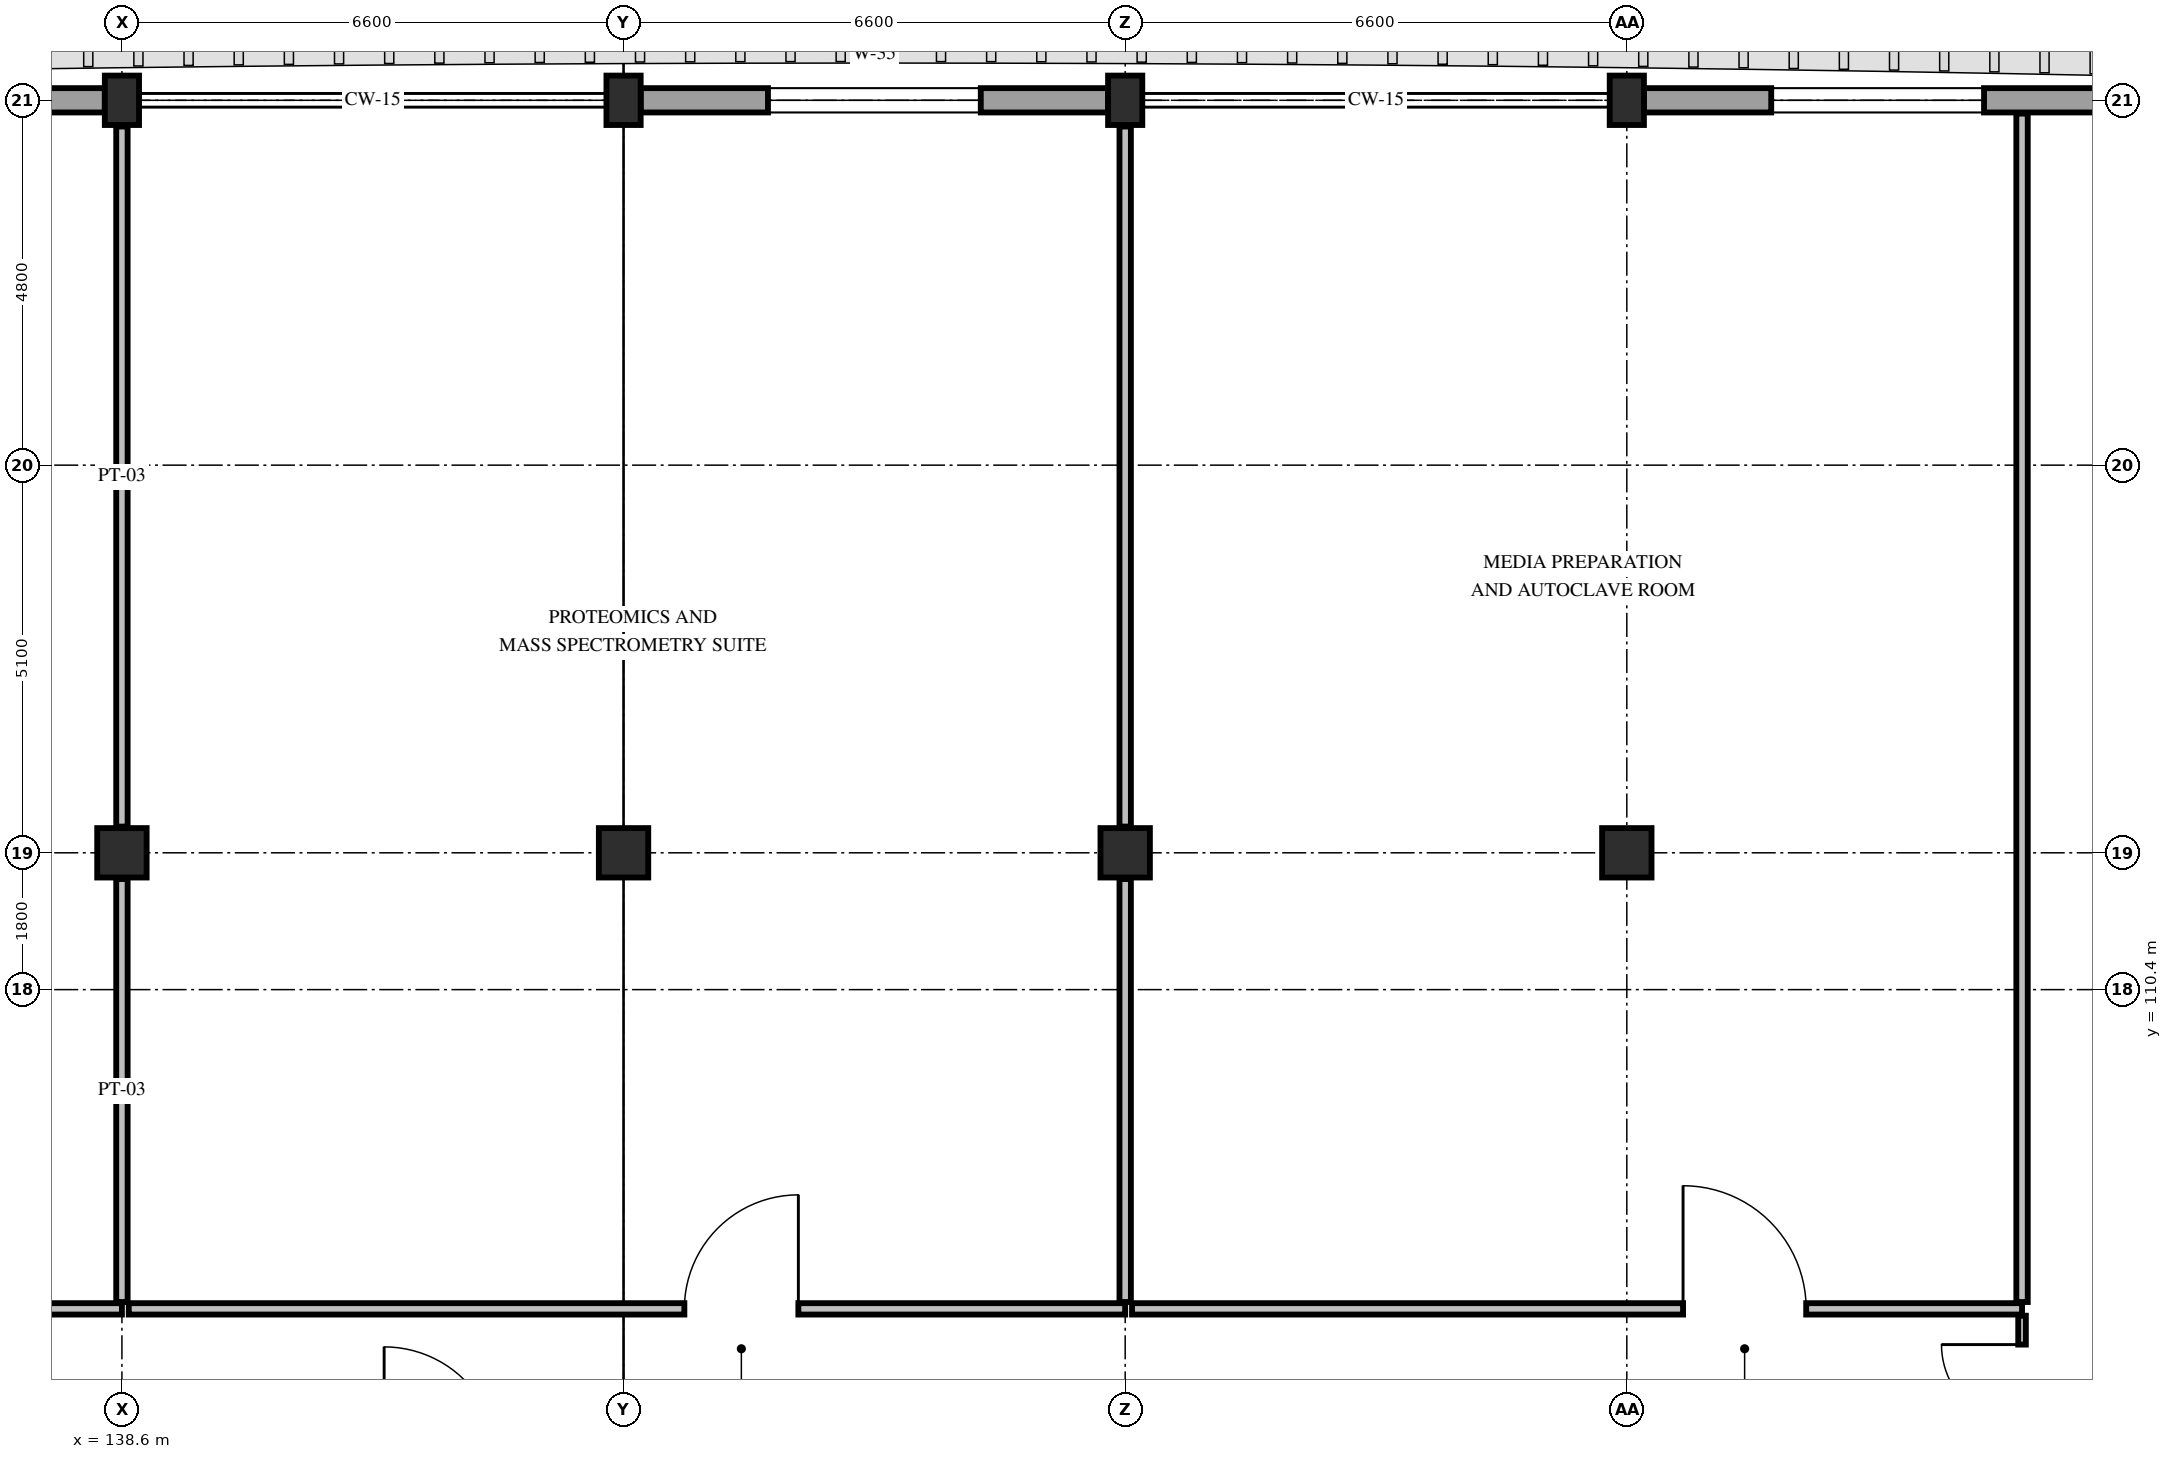
"""IFC4 building model, lengths in metres.
Left out: names, types, materials, properties, quantities, classifications, styles, units other than length and angle.
Written with IfcOpenShell. Run it as: python <this file> out.ifc"""

import sys

from ifc_helpers import new_model, si_unit, direction, frame, frame_2d, origin, origin_2d, place, context, subcontext, project, spatial, rectangle, extrude, element, fill, save


model = new_model("IFC4")
c1 = context("Model", 3, precision=1e-05, world=origin(), true_north=direction((0.0, 1.0)))
c2 = subcontext(c1, "Body", "Model", "MODEL_VIEW")
j1 = project(units=[si_unit("LENGTHUNIT", "METRE"), si_unit("PLANEANGLEUNIT", "RADIAN")], contexts=[c1])
p1 = place(None, origin())
s1 = spatial("IfcSite", under=j1, at=p1, CompositionType="ELEMENT")
p2 = place(p1, origin())
s2 = spatial("IfcBuilding", under=s1, at=p2, CompositionType="ELEMENT")
p3 = place(p2, frame((0.0, 0.0, 15.0)))
s3 = spatial("IfcBuildingStorey", under=s2, at=p3, CompositionType="ELEMENT", Elevation=15.0)
p4 = place(p3, frame((138.6, 112.2, 0.0), z_axis=(0.0, 0.0, 1.0), x_axis=(1.0, 0.0, 0.0)))
e1 = element("IfcColumn", 1, at=p4, inside=s3, PredefinedType="COLUMN", context=c2, shape_type="SweptSolid", body=[
    extrude(rectangle(XDim=0.65, YDim=0.65, at=origin_2d()), origin(), (0.0, 0.0, 1.0), 4.8),
])
p5 = place(p3, frame((138.6, 122.1, 0.0), z_axis=(0.0, 0.0, 1.0), x_axis=(1.0, 0.0, 0.0)))
e2 = element("IfcColumn", 2, at=p5, inside=s3, PredefinedType="PILASTER", context=c2, shape_type="SweptSolid", body=[
    extrude(rectangle(XDim=0.45, YDim=0.65, at=origin_2d()), origin(), (0.0, 0.0, 1.0), 4.8),
])
p6 = place(p3, frame((145.2, 112.2, 0.0), z_axis=(0.0, 0.0, 1.0), x_axis=(1.0, 0.0, 0.0)))
e3 = element("IfcColumn", 3, at=p6, inside=s3, PredefinedType="COLUMN", context=c2, shape_type="SweptSolid", body=[
    extrude(rectangle(XDim=0.65, YDim=0.65, at=origin_2d()), origin(), (0.0, 0.0, 1.0), 4.8),
])
p7 = place(p3, frame((145.2, 122.1, 0.0), z_axis=(0.0, 0.0, 1.0), x_axis=(1.0, 0.0, 0.0)))
e4 = element("IfcColumn", 4, at=p7, inside=s3, PredefinedType="PILASTER", context=c2, shape_type="SweptSolid", body=[
    extrude(rectangle(XDim=0.45, YDim=0.65, at=origin_2d()), origin(), (0.0, 0.0, 1.0), 4.8),
])
p8 = place(p3, frame((151.8, 112.2, 0.0), z_axis=(0.0, 0.0, 1.0), x_axis=(1.0, 0.0, 0.0)))
e5 = element("IfcColumn", 5, at=p8, inside=s3, PredefinedType="COLUMN", context=c2, shape_type="SweptSolid", body=[
    extrude(rectangle(XDim=0.65, YDim=0.65, at=origin_2d()), origin(), (0.0, 0.0, 1.0), 4.8),
])
p9 = place(p3, frame((151.8, 122.1, 0.0), z_axis=(0.0, 0.0, 1.0), x_axis=(1.0, 0.0, 0.0)))
e6 = element("IfcColumn", 6, at=p9, inside=s3, PredefinedType="PILASTER", context=c2, shape_type="SweptSolid", body=[
    extrude(rectangle(XDim=0.45, YDim=0.65, at=origin_2d()), origin(), (0.0, 0.0, 1.0), 4.8),
])
p10 = place(p3, frame((158.4, 112.2, 0.0), z_axis=(0.0, 0.0, 1.0), x_axis=(1.0, 0.0, 0.0)))
e7 = element("IfcColumn", 7, at=p10, inside=s3, PredefinedType="COLUMN", context=c2, shape_type="SweptSolid", body=[
    extrude(rectangle(XDim=0.65, YDim=0.65, at=origin_2d()), origin(), (0.0, 0.0, 1.0), 4.8),
])
p11 = place(p3, frame((158.4, 122.1, 0.0), z_axis=(0.0, 0.0, 1.0), x_axis=(1.0, 0.0, 0.0)))
e8 = element("IfcColumn", 8, at=p11, inside=s3, PredefinedType="PILASTER", context=c2, shape_type="SweptSolid", body=[
    extrude(rectangle(XDim=0.45, YDim=0.65, at=origin_2d()), origin(), (0.0, 0.0, 1.0), 4.8),
])
p12 = place(p3, frame((132.225, 122.1, 0.0), z_axis=(0.0, 0.0, 1.0), x_axis=(1.0, 0.0, 0.0)))
e9 = element("IfcWall", 9, at=p12, inside=s3, PredefinedType="STANDARD", context=c2, shape_type="SweptSolid", body=[
    extrude(rectangle(XDim=6.15, YDim=0.32, at=frame_2d((3.075, 0.0))), origin(), (0.0, 0.0, 1.0), 3.78),
])
p13 = place(p12, frame((1.675, 0.0, 0.85)))
e10 = element("IfcOpeningElement", 10, at=p13, cuts=e9, PredefinedType="OPENING", context=c2, shape_type="SweptSolid", body=[
    extrude(rectangle(XDim=2.8, YDim=1.88, at=frame_2d((1.4, 0.94))), frame((0.0, 0.175, 0.0), z_axis=(0.0, -1.0, 0.0), x_axis=(1.0, 0.0, 0.0)), (0.0, 0.0, 1.0), 0.35),
])
p14 = place(p3, frame((145.425, 122.1, 0.0), z_axis=(0.0, 0.0, 1.0), x_axis=(1.0, 0.0, 0.0)))
e11 = element("IfcWall", 11, at=p14, inside=s3, PredefinedType="STANDARD", context=c2, shape_type="SweptSolid", body=[
    extrude(rectangle(XDim=6.15, YDim=0.32, at=frame_2d((3.075, 0.0))), origin(), (0.0, 0.0, 1.0), 3.78),
])
p15 = place(p14, frame((1.675, 0.0, 0.85)))
e12 = element("IfcOpeningElement", 12, at=p15, cuts=e11, PredefinedType="OPENING", context=c2, shape_type="SweptSolid", body=[
    extrude(rectangle(XDim=2.8, YDim=1.88, at=frame_2d((1.4, 0.94))), frame((0.0, 0.175, 0.0), z_axis=(0.0, -1.0, 0.0), x_axis=(1.0, 0.0, 0.0)), (0.0, 0.0, 1.0), 0.35),
])
p16 = place(p3, frame((158.625, 122.1, 0.0), z_axis=(0.0, 0.0, 1.0), x_axis=(1.0, 0.0, 0.0)))
e13 = element("IfcWall", 13, at=p16, inside=s3, PredefinedType="STANDARD", context=c2, shape_type="SweptSolid", body=[
    extrude(rectangle(XDim=6.15, YDim=0.32, at=frame_2d((3.075, 0.0))), origin(), (0.0, 0.0, 1.0), 3.78),
])
p17 = place(p16, frame((1.675, 0.0, 0.85)))
e14 = element("IfcOpeningElement", 14, at=p17, cuts=e13, PredefinedType="OPENING", context=c2, shape_type="SweptSolid", body=[
    extrude(rectangle(XDim=2.8, YDim=1.88, at=frame_2d((1.4, 0.94))), frame((0.0, 0.175, 0.0), z_axis=(0.0, -1.0, 0.0), x_axis=(1.0, 0.0, 0.0)), (0.0, 0.0, 1.0), 0.35),
])
p18 = place(p3, frame((119.04, 106.2, 0.0), z_axis=(0.0, 0.0, 1.0), x_axis=(1.0, 0.0, 0.0)))
e15 = element("IfcWall", 15, at=p18, inside=s3, PredefinedType="PARTITIONING", context=c2, shape_type="SweptSolid", body=[
    extrude(rectangle(XDim=19.56, YDim=0.15, at=frame_2d((9.78, 0.0))), origin(), (0.0, 0.0, 1.0), 3.78),
])
p19 = place(p18, frame((9.02, 0.0, 0.0)))
e16 = element("IfcOpeningElement", 16, at=p19, cuts=e15, PredefinedType="OPENING", context=c2, shape_type="SweptSolid", body=[
    extrude(rectangle(XDim=1.56, YDim=2.3, at=frame_2d((0.78, 1.15))), frame((0.0, 0.09, 0.0), z_axis=(0.0, -1.0, 0.0), x_axis=(1.0, 0.0, 0.0)), (0.0, 0.0, 1.0), 0.18),
])
p20 = place(p3, frame((138.6, 106.29, 0.0), z_axis=(0.0, 0.0, 1.0), x_axis=(0.0, 1.0, 0.0)))
e17 = element("IfcWall", 17, at=p20, inside=s3, PredefinedType="PARTITIONING", context=c2, shape_type="SweptSolid", body=[
    extrude(rectangle(XDim=5.565, YDim=0.15, at=frame_2d((2.782, 0.0))), origin(), (0.0, 0.0, 1.0), 3.78),
])
p21 = place(p3, frame((138.6, 112.545, 0.0), z_axis=(0.0, 0.0, 1.0), x_axis=(0.0, 1.0, 0.0)))
e18 = element("IfcWall", 18, at=p21, inside=s3, PredefinedType="PARTITIONING", context=c2, shape_type="SweptSolid", body=[
    extrude(rectangle(XDim=9.21, YDim=0.15, at=frame_2d((4.605, 0.0))), origin(), (0.0, 0.0, 1.0), 3.78),
])
p22 = place(p3, frame((138.69, 106.2, 0.0), z_axis=(0.0, 0.0, 1.0), x_axis=(1.0, 0.0, 0.0)))
e19 = element("IfcWall", 19, at=p22, inside=s3, PredefinedType="PARTITIONING", context=c2, shape_type="SweptSolid", body=[
    extrude(rectangle(XDim=13.11, YDim=0.15, at=frame_2d((6.555, 0.0))), origin(), (0.0, 0.0, 1.0), 3.78),
])
p23 = place(p22, frame((7.31, 0.0, 0.0)))
e20 = element("IfcOpeningElement", 20, at=p23, cuts=e19, PredefinedType="OPENING", context=c2, shape_type="SweptSolid", body=[
    extrude(rectangle(XDim=1.5, YDim=2.25, at=frame_2d((0.75, 1.125))), frame((0.0, 0.09, 0.0), z_axis=(0.0, -1.0, 0.0), x_axis=(1.0, 0.0, 0.0)), (0.0, 0.0, 1.0), 0.18),
])
p24 = place(p3, frame((151.8, 106.29, 0.0), z_axis=(0.0, 0.0, 1.0), x_axis=(0.0, 1.0, 0.0)))
e21 = element("IfcWall", 21, at=p24, inside=s3, PredefinedType="PARTITIONING", context=c2, shape_type="SweptSolid", body=[
    extrude(rectangle(XDim=5.565, YDim=0.15, at=frame_2d((2.782, 0.0))), origin(), (0.0, 0.0, 1.0), 3.78),
])
p25 = place(p3, frame((151.8, 112.545, 0.0), z_axis=(0.0, 0.0, 1.0), x_axis=(0.0, 1.0, 0.0)))
e22 = element("IfcWall", 22, at=p25, inside=s3, PredefinedType="PARTITIONING", context=c2, shape_type="SweptSolid", body=[
    extrude(rectangle(XDim=9.21, YDim=0.15, at=frame_2d((4.605, 0.0))), origin(), (0.0, 0.0, 1.0), 3.78),
])
p26 = place(p3, frame((151.89, 106.2, 0.0), z_axis=(0.0, 0.0, 1.0), x_axis=(1.0, 0.0, 0.0)))
e23 = element("IfcWall", 23, at=p26, inside=s3, PredefinedType="PARTITIONING", context=c2, shape_type="SweptSolid", body=[
    extrude(rectangle(XDim=11.71, YDim=0.15, at=frame_2d((5.855, 0.0))), origin(), (0.0, 0.0, 1.0), 3.78),
])
p27 = place(p26, frame((7.25, 0.0, 0.0)))
e24 = element("IfcOpeningElement", 24, at=p27, cuts=e23, PredefinedType="OPENING", context=c2, shape_type="SweptSolid", body=[
    extrude(rectangle(XDim=1.62, YDim=2.3, at=frame_2d((0.81, 1.15))), frame((0.0, 0.09, 0.0), z_axis=(0.0, -1.0, 0.0), x_axis=(1.0, 0.0, 0.0)), (0.0, 0.0, 1.0), 0.18),
])
p28 = place(p3, frame((163.6, 106.29, 0.0), z_axis=(0.0, 0.0, 1.0), x_axis=(0.0, 1.0, 0.0)))
e25 = element("IfcWall", 25, at=p28, inside=s3, PredefinedType="PARTITIONING", context=c2, shape_type="SweptSolid", body=[
    extrude(rectangle(XDim=15.635, YDim=0.15, at=frame_2d((7.817, 0.0))), origin(), (0.0, 0.0, 1.0), 3.93),
])
p29 = place(p3, frame((163.6, 102.3, 0.0), z_axis=(0.0, 0.0, 1.0), x_axis=(0.0, 1.0, 0.0)))
e26 = element("IfcWall", 26, at=p29, inside=s3, PredefinedType="PARTITIONING", context=c2, shape_type="SweptSolid", body=[
    extrude(rectangle(XDim=3.81, YDim=0.1, at=frame_2d((1.905, 0.0))), origin(), (0.0, 0.0, 1.0), 4.065),
])
p30 = place(p29, frame((2.37, 0.0, 0.0)))
e27 = element("IfcOpeningElement", 27, at=p30, cuts=e26, PredefinedType="OPENING", context=c2, shape_type="SweptSolid", body=[
    extrude(rectangle(XDim=1.06, YDim=2.2, at=frame_2d((0.53, 1.1))), frame((0.0, 0.065, 0.0), z_axis=(0.0, -1.0, 0.0), x_axis=(1.0, 0.0, 0.0)), (0.0, 0.0, 1.0), 0.13),
])
p31 = place(p15, origin())
e28 = element("IfcWindow", 28, at=p31, inside=s3, PartitioningType="DOUBLE_PANEL_VERTICAL", PredefinedType="WINDOW", context=c2, shape_type="SweptSolid", body=[
    extrude(rectangle(XDim=2.8, YDim=1.88, at=frame_2d((1.4, 0.94))), frame((0.0, 0.03, 0.0), z_axis=(0.0, -1.0, 0.0), x_axis=(1.0, 0.0, 0.0)), (0.0, 0.0, 1.0), 0.06),
])
fill(e12, e28)
p32 = place(p17, origin())
e29 = element("IfcWindow", 29, at=p32, inside=s3, PartitioningType="DOUBLE_PANEL_VERTICAL", PredefinedType="WINDOW", context=c2, shape_type="SweptSolid", body=[
    extrude(rectangle(XDim=2.8, YDim=1.88, at=frame_2d((1.4, 0.94))), frame((0.0, 0.03, 0.0), z_axis=(0.0, -1.0, 0.0), x_axis=(1.0, 0.0, 0.0)), (0.0, 0.0, 1.0), 0.06),
])
fill(e14, e29)
p33 = place(p23, origin())
e30 = element("IfcDoor", 30, at=p33, inside=s3, OperationType="SINGLE_SWING_RIGHT", PredefinedType="DOOR", context=c2, shape_type="SweptSolid", body=[
    extrude(rectangle(XDim=1.5, YDim=2.25, at=frame_2d((0.75, 1.125))), frame((0.0, 0.025, 0.0), z_axis=(0.0, -1.0, 0.0), x_axis=(1.0, 0.0, 0.0)), (0.0, 0.0, 1.0), 0.05),
])
fill(e20, e30)
p34 = place(p27, origin())
e31 = element("IfcDoor", 31, at=p34, inside=s3, OperationType="SINGLE_SWING_LEFT", PredefinedType="DOOR", context=c2, shape_type="SweptSolid", body=[
    extrude(rectangle(XDim=1.62, YDim=2.3, at=frame_2d((0.81, 1.15))), frame((0.0, 0.025, 0.0), z_axis=(0.0, -1.0, 0.0), x_axis=(1.0, 0.0, 0.0)), (0.0, 0.0, 1.0), 0.05),
])
fill(e24, e31)
p35 = place(p30, origin())
e32 = element("IfcDoor", 32, at=p35, inside=s3, OperationType="SINGLE_SWING_RIGHT", PredefinedType="DOOR", context=c2, shape_type="SweptSolid", body=[
    extrude(rectangle(XDim=1.06, YDim=2.2, at=frame_2d((0.53, 1.1))), frame((0.0, 0.025, 0.0), z_axis=(0.0, -1.0, 0.0), x_axis=(1.0, 0.0, 0.0)), (0.0, 0.0, 1.0), 0.05),
])
fill(e27, e32)
save(model, sys.argv[1])
